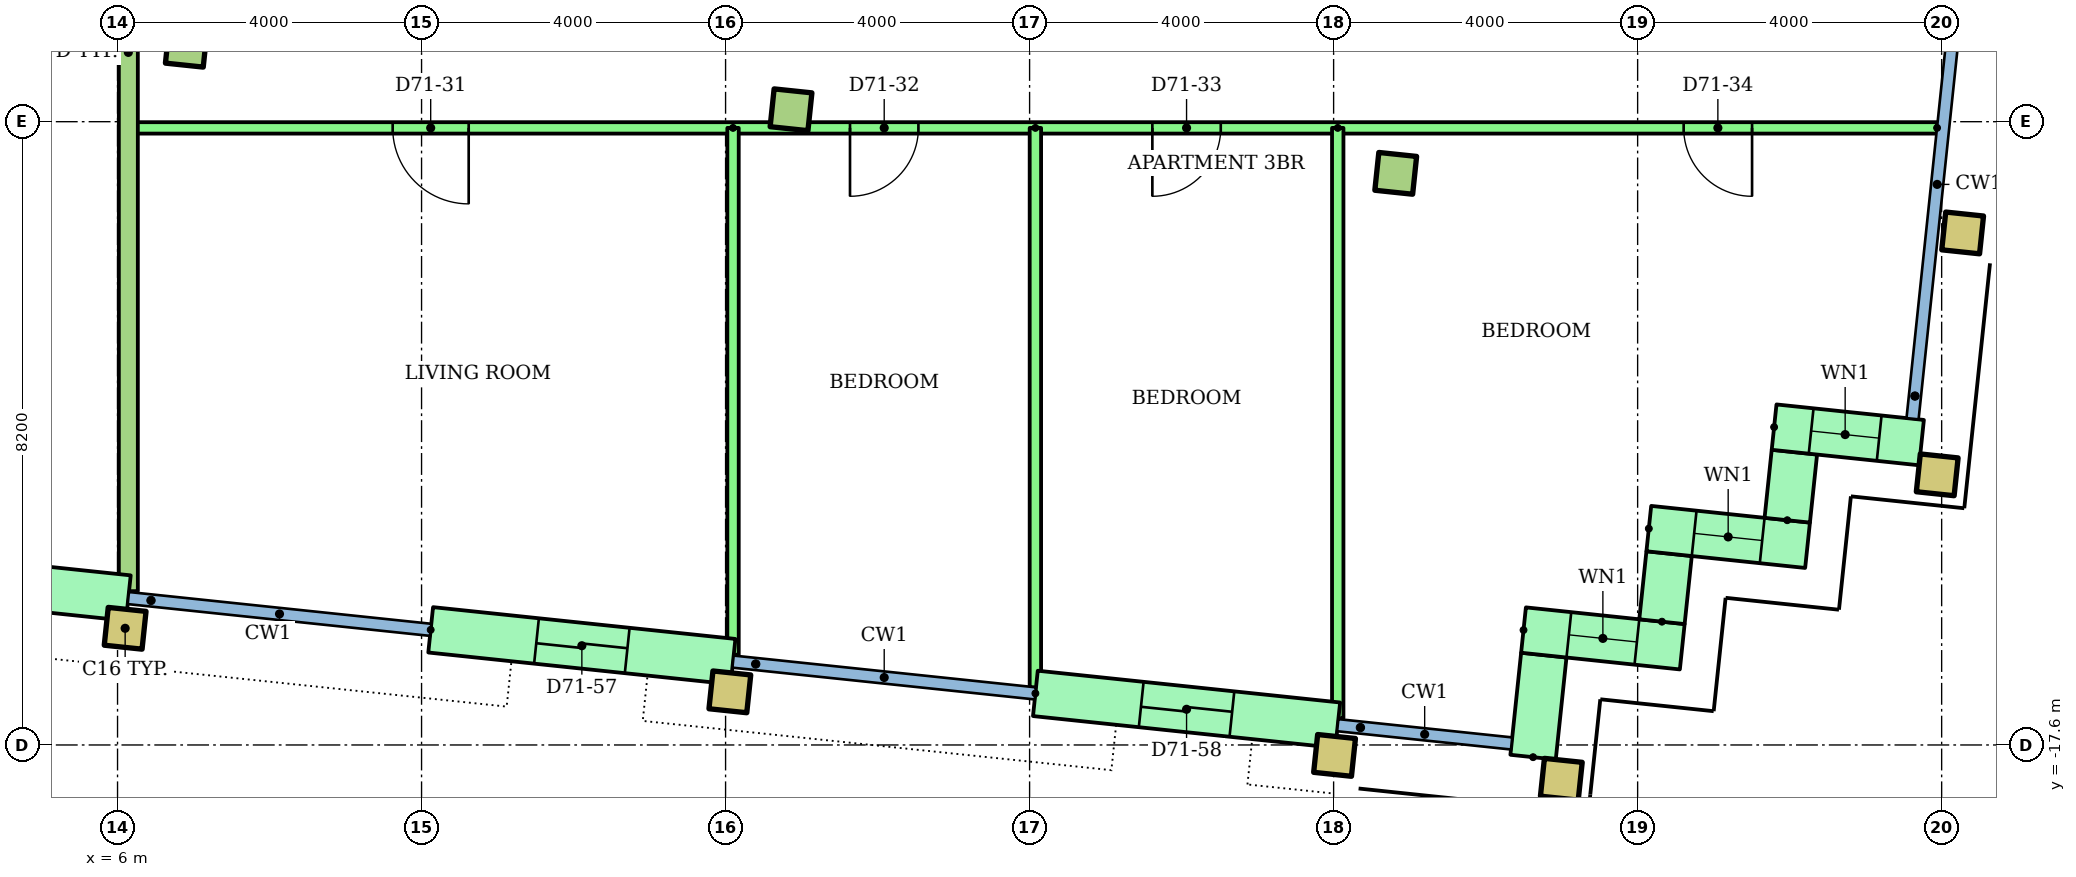
"""IFC4 building model, lengths in metres.
Left out: names, types, materials, properties, quantities, classifications, styles, units other than length and angle.
Written with IfcOpenShell. Run it as: python <this file> out.ifc"""

import sys

from ifc_helpers import new_model, si_unit, direction, frame, frame_2d, origin, origin_2d, place, context, subcontext, project, spatial, rectangle, hollow_rectangle, extrude, element, fill, save


model = new_model("IFC4")
c1 = context("Model", 3, precision=1e-05, world=origin(), true_north=direction((0.0, 1.0)))
c2 = subcontext(c1, "Body", "Model", "MODEL_VIEW")
j1 = project(units=[si_unit("LENGTHUNIT", "METRE"), si_unit("PLANEANGLEUNIT", "RADIAN")], contexts=[c1])
p1 = place(None, origin())
s1 = spatial("IfcSite", under=j1, at=p1, CompositionType="ELEMENT")
p2 = place(p1, origin())
s2 = spatial("IfcBuilding", under=s1, at=p2, CompositionType="ELEMENT")
p3 = place(p2, frame((0.0, 0.0, 272.3)))
s3 = spatial("IfcBuildingStorey", under=s2, at=p3, CompositionType="ELEMENT", Elevation=272.3)
for number, where, z_axis, x_axis in (
    (1, (6.1, -16.065, 0.0), (0.0, 0.0, 1.0), (0.995, -0.105, 0.0)),
    (2, (14.056, -16.901, 0.0), (0.0, 0.0, 1.0), (0.995, -0.105, 0.0)),
    (3, (22.012, -17.737, 0.0), (0.0, 0.0, 1.0), (0.995, -0.105, 0.0)),
    (4, (24.996, -18.051, 0.0), (0.0, 0.0, 1.0), (0.995, -0.105, 0.0)),
    (5, (29.942, -14.046, 0.0), (0.0, 0.0, 1.0), (0.995, -0.105, 0.0)),
):
    element("IfcColumn", number, at=place(p3, frame(where, z_axis=z_axis, x_axis=x_axis)), inside=s3, PredefinedType="COLUMN", context=c2, shape_type="SweptSolid", body=[
        extrude(hollow_rectangle(XDim=0.5, YDim=0.5, WallThickness=0.025, at=origin_2d()), origin(), (0.0, 0.0, 1.0), 3.2),
    ])
for number, where, z_axis, x_axis in (
    (6, (6.905, -8.407, 0.0), (0.0, 0.0, 1.0), (0.995, -0.105, 0.0)),
    (7, (14.861, -9.243, 0.0), (0.0, 0.0, 1.0), (0.995, -0.105, 0.0)),
    (8, (22.817, -10.08, 0.0), (0.0, 0.0, 1.0), (0.995, -0.105, 0.0)),
):
    element("IfcColumn", number, at=place(p3, frame(where, z_axis=z_axis, x_axis=x_axis)), inside=s3, PredefinedType="COLUMN", context=c2, shape_type="SweptSolid", body=[
        extrude(rectangle(XDim=0.5, YDim=0.5, at=origin_2d()), origin(), (0.0, 0.0, 1.0), 3.2),
    ])
p4 = place(p3, frame((30.276, -10.864, 0.0), z_axis=(0.0, 0.0, 1.0), x_axis=(0.994521895368, -0.104528463268, 0.0)))
e9 = element("IfcColumn", 9, at=p4, inside=s3, PredefinedType="COLUMN", context=c2, shape_type="SweptSolid", body=[
    extrude(hollow_rectangle(XDim=0.5, YDim=0.5, WallThickness=0.025, at=origin_2d()), origin(), (0.0, 0.0, 1.0), 3.2),
])
p5 = place(p3, frame((2.164, -15.249, 0.0), z_axis=(0.0, 0.0, 1.0), x_axis=(0.99452550138, -0.104494148666, 0.0)))
e10 = element("IfcWall", 10, at=p5, inside=s3, PredefinedType="STANDARD", context=c2, shape_type="SweptSolid", body=[
    extrude(rectangle(XDim=4.0, YDim=0.6, at=frame_2d((2.0, 0.0))), origin(), (0.0, 0.0, 1.0), 2.92),
])
p6 = place(p5, frame((1.4, 0.0, 0.0)))
e11 = element("IfcOpeningElement", 11, at=p6, cuts=e10, PredefinedType="OPENING", context=c2, shape_type="SweptSolid", body=[
    extrude(rectangle(XDim=1.2, YDim=2.1, at=frame_2d((0.6, 1.05))), frame((0.0, 0.31, 0.0), z_axis=(0.0, -1.0, 0.0), x_axis=(1.0, 0.0, 0.0)), (0.0, 0.0, 1.0), 0.62),
])
p7 = place(p3, frame((10.12, -16.085, 0.0), z_axis=(0.0, 0.0, 1.0), x_axis=(0.994519156568, -0.104554517933, 0.0)))
e12 = element("IfcWall", 12, at=p7, inside=s3, PredefinedType="STANDARD", context=c2, shape_type="SweptSolid", body=[
    extrude(rectangle(XDim=4.0, YDim=0.6, at=frame_2d((2.0, 0.0))), origin(), (0.0, 0.0, 1.0), 2.92),
])
p8 = place(p7, frame((1.4, 0.0, 0.0)))
e13 = element("IfcOpeningElement", 13, at=p8, cuts=e12, PredefinedType="OPENING", context=c2, shape_type="SweptSolid", body=[
    extrude(rectangle(XDim=1.2, YDim=2.1, at=frame_2d((0.6, 1.05))), frame((0.0, 0.31, 0.0), z_axis=(0.0, -1.0, 0.0), x_axis=(1.0, 0.0, 0.0)), (0.0, 0.0, 1.0), 0.62),
])
p9 = place(p3, frame((18.076, -16.921, 0.0), z_axis=(0.0, 0.0, 1.0), x_axis=(0.994519156568, -0.104554517933, 0.0)))
e14 = element("IfcWall", 14, at=p9, inside=s3, PredefinedType="STANDARD", context=c2, shape_type="SweptSolid", body=[
    extrude(rectangle(XDim=4.0, YDim=0.6, at=frame_2d((2.0, 0.0))), origin(), (0.0, 0.0, 1.0), 2.92),
])
p10 = place(p9, frame((1.4, 0.0, 0.0)))
e15 = element("IfcOpeningElement", 15, at=p10, cuts=e14, PredefinedType="OPENING", context=c2, shape_type="SweptSolid", body=[
    extrude(rectangle(XDim=1.2, YDim=2.1, at=frame_2d((0.6, 1.05))), frame((0.0, 0.31, 0.0), z_axis=(0.0, -1.0, 0.0), x_axis=(1.0, 0.0, 0.0)), (0.0, 0.0, 1.0), 0.62),
])
p11 = place(p3, frame((24.625, -17.76, 0.0), z_axis=(0.0, 0.0, 1.0), x_axis=(0.104355269718, 0.994540083497, 0.0)))
e16 = element("IfcWall", 16, at=p11, inside=s3, PredefinedType="STANDARD", context=c2, shape_type="SweptSolid", body=[
    extrude(rectangle(XDim=1.35, YDim=0.6, at=frame_2d((0.675, 0.0))), origin(), (0.0, 0.0, 1.0), 2.92),
])
p12 = place(p3, frame((24.499, -16.088, 0.0), z_axis=(0.0, 0.0, 1.0), x_axis=(0.994522640205, -0.104521376379, 0.0)))
e17 = element("IfcWall", 17, at=p12, inside=s3, PredefinedType="STANDARD", context=c2, shape_type="SweptSolid", body=[
    extrude(rectangle(XDim=2.1, YDim=0.6, at=frame_2d((1.05, 0.0))), origin(), (0.0, 0.0, 1.0), 2.92),
])
p13 = place(p12, frame((0.6, 0.0, 0.9)))
e18 = element("IfcOpeningElement", 18, at=p13, cuts=e17, PredefinedType="OPENING", context=c2, shape_type="SweptSolid", body=[
    extrude(rectangle(XDim=0.9, YDim=1.5, at=frame_2d((0.45, 0.75))), frame((0.0, 0.31, 0.0), z_axis=(0.0, -1.0, 0.0), x_axis=(1.0, 0.0, 0.0)), (0.0, 0.0, 1.0), 0.62),
])
p14 = place(p3, frame((26.32, -15.978, 0.0), z_axis=(0.0, 0.0, 1.0), x_axis=(0.104444712852, 0.994530694326, 0.0)))
e19 = element("IfcWall", 19, at=p14, inside=s3, PredefinedType="STANDARD", context=c2, shape_type="SweptSolid", body=[
    extrude(rectangle(XDim=0.9, YDim=0.6, at=frame_2d((0.45, 0.0))), origin(), (0.0, 0.0, 1.0), 2.92),
])
p15 = place(p3, frame((26.147, -14.753, 0.0), z_axis=(0.0, 0.0, 1.0), x_axis=(0.994522640205, -0.104521376379, 0.0)))
e20 = element("IfcWall", 20, at=p15, inside=s3, PredefinedType="STANDARD", context=c2, shape_type="SweptSolid", body=[
    extrude(rectangle(XDim=2.1, YDim=0.6, at=frame_2d((1.05, 0.0))), origin(), (0.0, 0.0, 1.0), 2.92),
])
p16 = place(p15, frame((0.6, 0.0, 0.9)))
e21 = element("IfcOpeningElement", 21, at=p16, cuts=e20, PredefinedType="OPENING", context=c2, shape_type="SweptSolid", body=[
    extrude(rectangle(XDim=0.9, YDim=1.5, at=frame_2d((0.45, 0.75))), frame((0.0, 0.31, 0.0), z_axis=(0.0, -1.0, 0.0), x_axis=(1.0, 0.0, 0.0)), (0.0, 0.0, 1.0), 0.62),
])
p17 = place(p3, frame((27.969, -14.643, 0.0), z_axis=(0.0, 0.0, 1.0), x_axis=(0.104416541099, 0.994533652495, 0.0)))
e22 = element("IfcWall", 22, at=p17, inside=s3, PredefinedType="STANDARD", context=c2, shape_type="SweptSolid", body=[
    extrude(rectangle(XDim=0.9, YDim=0.6, at=frame_2d((0.45, 0.0))), origin(), (0.0, 0.0, 1.0), 2.92),
])
p18 = place(p3, frame((27.796, -13.418, 0.0), z_axis=(0.0, 0.0, 1.0), x_axis=(0.994519850893, -0.104547913319, 0.0)))
e23 = element("IfcWall", 23, at=p18, inside=s3, PredefinedType="STANDARD", context=c2, shape_type="SweptSolid", body=[
    extrude(rectangle(XDim=1.95, YDim=0.6, at=frame_2d((0.975, 0.0))), origin(), (0.0, 0.0, 1.0), 2.92),
])
p19 = place(p18, frame((0.49, 0.0, 0.9)))
e24 = element("IfcOpeningElement", 24, at=p19, cuts=e23, PredefinedType="OPENING", context=c2, shape_type="SweptSolid", body=[
    extrude(rectangle(XDim=0.9, YDim=1.5, at=frame_2d((0.45, 0.75))), frame((0.0, 0.31, 0.0), z_axis=(0.0, -1.0, 0.0), x_axis=(1.0, 0.0, 0.0)), (0.0, 0.0, 1.0), 0.62),
])
p20 = place(p3, frame((29.94, -9.482, 0.0), z_axis=(0.0, 0.0, 1.0), x_axis=(-1.0, 0.0, 0.0)))
e25 = element("IfcWall", 25, at=p20, inside=s3, PredefinedType="PARTITIONING", context=c2, shape_type="SweptSolid", body=[
    extrude(rectangle(XDim=23.798, YDim=0.15, at=frame_2d((11.899, 0.0))), origin(), (0.0, 0.0, 1.0), 2.4),
])
p21 = place(p20, frame((19.32, 0.0, 0.0)))
e26 = element("IfcOpeningElement", 26, at=p21, cuts=e25, PredefinedType="OPENING", context=c2, shape_type="SweptSolid", body=[
    extrude(rectangle(XDim=1.0, YDim=2.1, at=frame_2d((0.5, 1.05))), frame((0.0, 0.085, 0.0), z_axis=(0.0, -1.0, 0.0), x_axis=(1.0, 0.0, 0.0)), (0.0, 0.0, 1.0), 0.17),
])
p22 = place(p20, frame((13.403, 0.0, 0.0)))
e27 = element("IfcOpeningElement", 27, at=p22, cuts=e25, PredefinedType="OPENING", context=c2, shape_type="SweptSolid", body=[
    extrude(rectangle(XDim=0.9, YDim=2.1, at=frame_2d((0.45, 1.05))), frame((0.0, 0.085, 0.0), z_axis=(0.0, -1.0, 0.0), x_axis=(1.0, 0.0, 0.0)), (0.0, 0.0, 1.0), 0.17),
])
p23 = place(p20, frame((9.425, 0.0, 0.0)))
e28 = element("IfcOpeningElement", 28, at=p23, cuts=e25, PredefinedType="OPENING", context=c2, shape_type="SweptSolid", body=[
    extrude(rectangle(XDim=0.9, YDim=2.1, at=frame_2d((0.45, 1.05))), frame((0.0, 0.085, 0.0), z_axis=(0.0, -1.0, 0.0), x_axis=(1.0, 0.0, 0.0)), (0.0, 0.0, 1.0), 0.17),
])
p24 = place(p20, frame((2.434, 0.0, 0.0)))
e29 = element("IfcOpeningElement", 29, at=p24, cuts=e25, PredefinedType="OPENING", context=c2, shape_type="SweptSolid", body=[
    extrude(rectangle(XDim=0.9, YDim=2.1, at=frame_2d((0.45, 1.05))), frame((0.0, 0.085, 0.0), z_axis=(0.0, -1.0, 0.0), x_axis=(1.0, 0.0, 0.0)), (0.0, 0.0, 1.0), 0.17),
])
p25 = place(p3, frame((14.098, -9.482, 0.0), z_axis=(0.0, 0.0, 1.0), x_axis=(0.0, -1.0, 0.0)))
e30 = element("IfcWall", 30, at=p25, inside=s3, PredefinedType="PARTITIONING", context=c2, shape_type="SweptSolid", body=[
    extrude(rectangle(XDim=6.931, YDim=0.15, at=frame_2d((3.466, 0.0))), origin(), (0.0, 0.0, 1.0), 2.4),
])
p26 = place(p3, frame((18.076, -9.482, 0.0), z_axis=(0.0, 0.0, 1.0), x_axis=(0.0, -1.0, 0.0)))
e31 = element("IfcWall", 31, at=p26, inside=s3, PredefinedType="PARTITIONING", context=c2, shape_type="SweptSolid", body=[
    extrude(rectangle(XDim=7.36, YDim=0.15, at=frame_2d((3.68, 0.0))), origin(), (0.0, 0.0, 1.0), 2.4),
])
p27 = place(p3, frame((22.054, -9.482, 0.0), z_axis=(0.0, 0.0, 1.0), x_axis=(0.0, -1.0, 0.0)))
e32 = element("IfcWall", 32, at=p27, inside=s3, PredefinedType="PARTITIONING", context=c2, shape_type="SweptSolid", body=[
    extrude(rectangle(XDim=7.767, YDim=0.15, at=frame_2d((3.884, 0.0))), origin(), (0.0, 0.0, 1.0), 2.4),
])
p28 = place(p3, frame((6.142, -1.4, 0.0), z_axis=(0.0, 0.0, 1.0), x_axis=(0.0, -1.0, 0.0)))
e33 = element("IfcWall", 33, at=p28, inside=s3, PredefinedType="PARTITIONING", context=c2, shape_type="SweptSolid", body=[
    extrude(rectangle(XDim=14.177, YDim=0.25, at=frame_2d((7.088, 0.0))), origin(), (0.0, 0.0, 1.0), 2.4),
])
p29 = place(p13, origin())
e34 = element("IfcWindow", 34, at=p29, inside=s3, PartitioningType="SINGLE_PANEL", PredefinedType="WINDOW", context=c2, shape_type="SweptSolid", body=[
    extrude(rectangle(XDim=0.9, YDim=1.5, at=frame_2d((0.45, 0.75))), frame((0.0, 0.03, 0.0), z_axis=(0.0, -1.0, 0.0), x_axis=(1.0, 0.0, 0.0)), (0.0, 0.0, 1.0), 0.06),
])
fill(e18, e34)
p30 = place(p16, origin())
e35 = element("IfcWindow", 35, at=p30, inside=s3, PartitioningType="SINGLE_PANEL", PredefinedType="WINDOW", context=c2, shape_type="SweptSolid", body=[
    extrude(rectangle(XDim=0.9, YDim=1.5, at=frame_2d((0.45, 0.75))), frame((0.0, 0.03, 0.0), z_axis=(0.0, -1.0, 0.0), x_axis=(1.0, 0.0, 0.0)), (0.0, 0.0, 1.0), 0.06),
])
fill(e21, e35)
p31 = place(p19, origin())
e36 = element("IfcWindow", 36, at=p31, inside=s3, PartitioningType="SINGLE_PANEL", PredefinedType="WINDOW", context=c2, shape_type="SweptSolid", body=[
    extrude(rectangle(XDim=0.9, YDim=1.5, at=frame_2d((0.45, 0.75))), frame((0.0, 0.03, 0.0), z_axis=(0.0, -1.0, 0.0), x_axis=(1.0, 0.0, 0.0)), (0.0, 0.0, 1.0), 0.06),
])
fill(e24, e36)
p32 = place(p21, origin())
e37 = element("IfcDoor", 37, at=p32, inside=s3, OperationType="SINGLE_SWING_LEFT", PredefinedType="DOOR", context=c2, shape_type="SweptSolid", body=[
    extrude(rectangle(XDim=1.0, YDim=2.1, at=frame_2d((0.5, 1.05))), frame((0.0, 0.025, 0.0), z_axis=(0.0, -1.0, 0.0), x_axis=(1.0, 0.0, 0.0)), (0.0, 0.0, 1.0), 0.05),
])
fill(e26, e37)
p33 = place(p22, origin())
e38 = element("IfcDoor", 38, at=p33, inside=s3, OperationType="SINGLE_SWING_RIGHT", PredefinedType="DOOR", context=c2, shape_type="SweptSolid", body=[
    extrude(rectangle(XDim=0.9, YDim=2.1, at=frame_2d((0.45, 1.05))), frame((0.0, 0.025, 0.0), z_axis=(0.0, -1.0, 0.0), x_axis=(1.0, 0.0, 0.0)), (0.0, 0.0, 1.0), 0.05),
])
fill(e27, e38)
p34 = place(p23, origin())
e39 = element("IfcDoor", 39, at=p34, inside=s3, OperationType="SINGLE_SWING_RIGHT", PredefinedType="DOOR", context=c2, shape_type="SweptSolid", body=[
    extrude(rectangle(XDim=0.9, YDim=2.1, at=frame_2d((0.45, 1.05))), frame((0.0, 0.025, 0.0), z_axis=(0.0, -1.0, 0.0), x_axis=(1.0, 0.0, 0.0)), (0.0, 0.0, 1.0), 0.05),
])
fill(e28, e39)
p35 = place(p24, origin())
e40 = element("IfcDoor", 40, at=p35, inside=s3, OperationType="SINGLE_SWING_LEFT", PredefinedType="DOOR", context=c2, shape_type="SweptSolid", body=[
    extrude(rectangle(XDim=0.9, YDim=2.1, at=frame_2d((0.45, 1.05))), frame((0.0, 0.025, 0.0), z_axis=(0.0, -1.0, 0.0), x_axis=(1.0, 0.0, 0.0)), (0.0, 0.0, 1.0), 0.05),
])
fill(e29, e40)
p36 = place(p8, origin())
e41 = element("IfcDoor", 41, at=p36, inside=s3, OperationType="SLIDING_TO_LEFT", PredefinedType="DOOR", context=c2, shape_type="SweptSolid", body=[
    extrude(rectangle(XDim=1.2, YDim=2.1, at=frame_2d((0.6, 1.05))), frame((0.0, 0.025, 0.0), z_axis=(0.0, -1.0, 0.0), x_axis=(1.0, 0.0, 0.0)), (0.0, 0.0, 1.0), 0.05),
])
fill(e13, e41)
p37 = place(p10, origin())
e42 = element("IfcDoor", 42, at=p37, inside=s3, OperationType="SLIDING_TO_LEFT", PredefinedType="DOOR", context=c2, shape_type="SweptSolid", body=[
    extrude(rectangle(XDim=1.2, YDim=2.1, at=frame_2d((0.6, 1.05))), frame((0.0, 0.025, 0.0), z_axis=(0.0, -1.0, 0.0), x_axis=(1.0, 0.0, 0.0)), (0.0, 0.0, 1.0), 0.05),
])
fill(e15, e42)
save(model, sys.argv[1])
